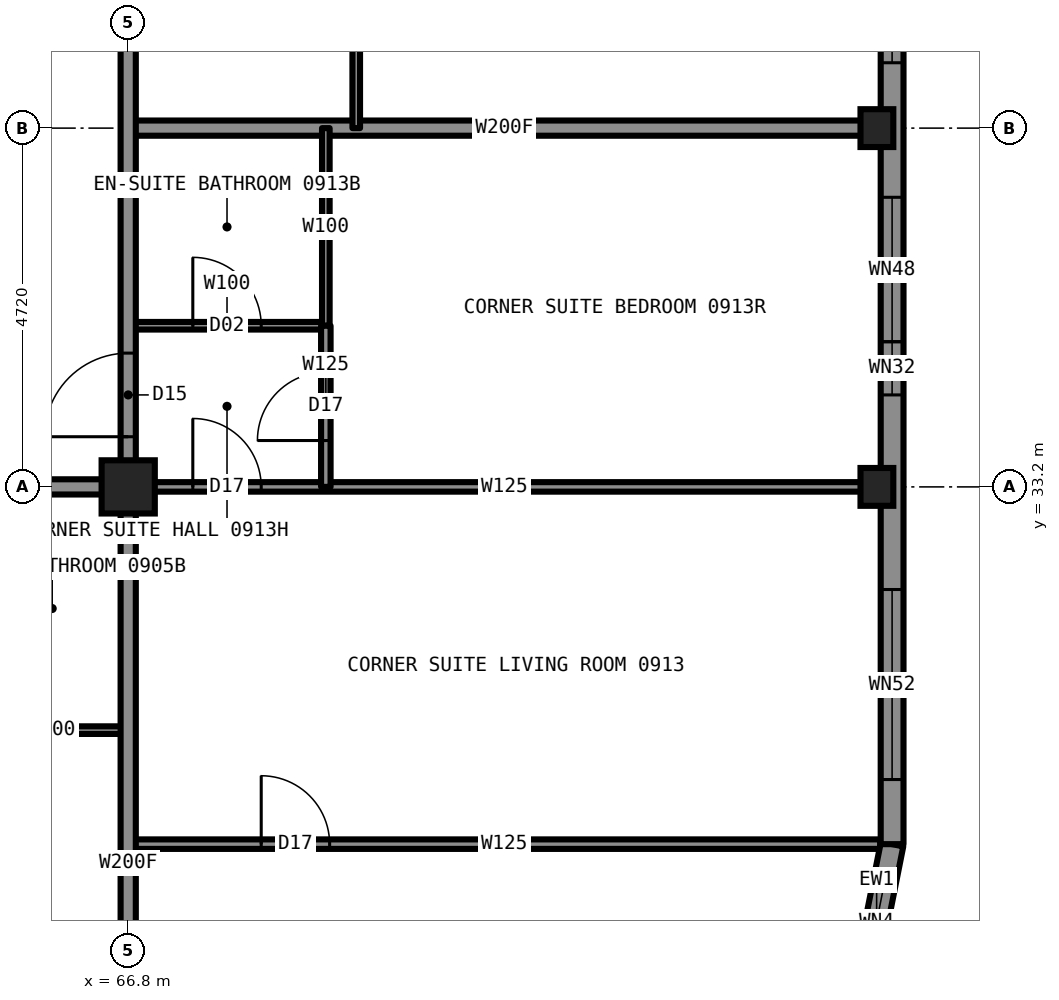
"""IFC4 building model, lengths in metres.
Left out: names, types, materials, properties, quantities, classifications, styles, units other than length and angle.
Written with IfcOpenShell. Run it as: python <this file> out.ifc"""

import sys

from ifc_helpers import new_model, si_unit, direction, frame, frame_2d, origin, origin_2d, place, context, subcontext, project, spatial, rectangle, hollow_rectangle, i_section, extrude, element, fill, save


model = new_model("IFC4")
c1 = context("Model", 3, precision=1e-05, world=origin(), true_north=direction((0.0, 1.0)))
c2 = subcontext(c1, "Body", "Model", "MODEL_VIEW")
j1 = project(units=[si_unit("LENGTHUNIT", "METRE"), si_unit("PLANEANGLEUNIT", "RADIAN")], contexts=[c1])
p1 = place(None, origin())
s1 = spatial("IfcSite", under=j1, at=p1, CompositionType="ELEMENT")
p2 = place(p1, origin())
s2 = spatial("IfcBuilding", under=s1, at=p2, CompositionType="ELEMENT")
p3 = place(p2, frame((0.0, 0.0, 39.0)))
s3 = spatial("IfcBuildingStorey", under=s2, at=p3, CompositionType="ELEMENT", Elevation=39.0)
for number, where, z_axis, x_axis in (
    (1, (76.65, 33.2, 0.0), (0.0, 0.0, 1.0), (1.0, 0.0, 0.0)),
    (2, (76.65, 37.92, 0.0), (0.0, 0.0, 1.0), (1.0, 0.0, 0.0)),
):
    element("IfcColumn", number, at=place(p3, frame(where, z_axis=z_axis, x_axis=x_axis)), inside=s3, PredefinedType="COLUMN", context=c2, shape_type="SweptSolid", body=[
        extrude(i_section(OverallWidth=0.432, OverallDepth=0.498, WebThickness=0.056, FlangeThickness=0.089, at=origin_2d()), origin(), (0.0, 0.0, 1.0), 3.5),
    ])
p4 = place(p3, frame((66.8, 33.2, 0.0), z_axis=(0.0, 0.0, 1.0), x_axis=(1.0, 0.0, 0.0)))
e3 = element("IfcColumn", 3, at=p4, inside=s3, PredefinedType="COLUMN", context=c2, shape_type="SweptSolid", body=[
    extrude(hollow_rectangle(XDim=0.7, YDim=0.7, WallThickness=0.06, at=origin_2d()), origin(), (0.0, 0.0, 1.0), 3.5),
])
p5 = place(p3, frame((43.2, 33.2, 0.0), z_axis=(0.0, 0.0, 1.0), x_axis=(1.0, 0.0, 0.0)))
e4 = element("IfcWall", 4, at=p5, inside=s3, PredefinedType="PARTITIONING", context=c2, shape_type="SweptSolid", body=[
    extrude(rectangle(XDim=23.6, YDim=0.2, at=frame_2d((11.8, 0.0))), origin(), (0.0, 0.0, 1.0), 3.33),
])
p6 = place(p5, frame((2.55, 0.0, 0.0)))
e5 = element("IfcOpeningElement", 5, at=p6, cuts=e4, PredefinedType="OPENING", context=c2, shape_type="SweptSolid", body=[
    extrude(rectangle(XDim=1.0, YDim=2.2, at=frame_2d((0.5, 1.1))), frame((0.0, 0.11, 0.0), z_axis=(0.0, -1.0, 0.0), x_axis=(1.0, 0.0, 0.0)), (0.0, 0.0, 1.0), 0.22),
])
p7 = place(p5, frame((6.57, 0.0, 0.0)))
e6 = element("IfcOpeningElement", 6, at=p7, cuts=e4, PredefinedType="OPENING", context=c2, shape_type="SweptSolid", body=[
    extrude(rectangle(XDim=1.1, YDim=2.2, at=frame_2d((0.55, 1.1))), frame((0.0, 0.11, 0.0), z_axis=(0.0, -1.0, 0.0), x_axis=(1.0, 0.0, 0.0)), (0.0, 0.0, 1.0), 0.22),
])
p8 = place(p5, frame((20.34, 0.0, 0.0)))
e7 = element("IfcOpeningElement", 7, at=p8, cuts=e4, PredefinedType="OPENING", context=c2, shape_type="SweptSolid", body=[
    extrude(rectangle(XDim=1.0, YDim=2.2, at=frame_2d((0.5, 1.1))), frame((0.0, 0.11, 0.0), z_axis=(0.0, -1.0, 0.0), x_axis=(1.0, 0.0, 0.0)), (0.0, 0.0, 1.0), 0.22),
])
p9 = place(p3, frame((66.8, 33.2, 0.0), z_axis=(0.0, 0.0, 1.0), x_axis=(1.0, 0.0, 0.0)))
e8 = element("IfcWall", 8, at=p9, inside=s3, PredefinedType="PARTITIONING", context=c2, shape_type="SweptSolid", body=[
    extrude(rectangle(XDim=9.9, YDim=0.125, at=frame_2d((4.95, 0.0))), origin(), (0.0, 0.0, 1.0), 2.573),
])
p10 = place(p9, frame((0.85, 0.0, 0.0)))
e9 = element("IfcOpeningElement", 9, at=p10, cuts=e8, PredefinedType="OPENING", context=c2, shape_type="SweptSolid", body=[
    extrude(rectangle(XDim=0.9, YDim=2.2, at=frame_2d((0.45, 1.1))), frame((0.0, 0.073, 0.0), z_axis=(0.0, -1.0, 0.0), x_axis=(1.0, 0.0, 0.0)), (0.0, 0.0, 1.0), 0.145),
])
p11 = place(p3, frame((64.8, 30.0, 0.0), z_axis=(0.0, 0.0, 1.0), x_axis=(1.0, 0.0, 0.0)))
e10 = element("IfcWall", 10, at=p11, inside=s3, PredefinedType="PARTITIONING", context=c2, shape_type="SweptSolid", body=[
    extrude(rectangle(XDim=2.0, YDim=0.1, at=frame_2d((1.0, 0.0))), origin(), (0.0, 0.0, 1.0), 3.33),
])
p12 = place(p3, frame((66.8, 28.5, 0.0), z_axis=(0.0, 0.0, 1.0), x_axis=(1.0, 0.0, 0.0)))
e11 = element("IfcWall", 11, at=p12, inside=s3, PredefinedType="PARTITIONING", context=c2, shape_type="SweptSolid", body=[
    extrude(rectangle(XDim=9.894, YDim=0.125, at=frame_2d((4.947, 0.0))), origin(), (0.0, 0.0, 1.0), 3.33),
])
p13 = place(p12, frame((1.75, 0.0, 0.0)))
e12 = element("IfcOpeningElement", 12, at=p13, cuts=e11, PredefinedType="OPENING", context=c2, shape_type="SweptSolid", body=[
    extrude(rectangle(XDim=0.9, YDim=2.2, at=frame_2d((0.45, 1.1))), frame((0.0, 0.073, 0.0), z_axis=(0.0, -1.0, 0.0), x_axis=(1.0, 0.0, 0.0)), (0.0, 0.0, 1.0), 0.145),
])
p14 = place(p3, frame((66.8, 37.92, 0.0), z_axis=(0.0, 0.0, 1.0), x_axis=(1.0, 0.0, 0.0)))
e13 = element("IfcWall", 13, at=p14, inside=s3, PredefinedType="PARTITIONING", context=c2, shape_type="SweptSolid", body=[
    extrude(rectangle(XDim=9.9, YDim=0.2, at=frame_2d((4.95, 0.0))), origin(), (0.0, 0.0, 1.0), 2.573),
])
p15 = place(p3, frame((66.8, 35.32, 0.0), z_axis=(0.0, 0.0, 1.0), x_axis=(1.0, 0.0, 0.0)))
e14 = element("IfcWall", 14, at=p15, inside=s3, PredefinedType="PARTITIONING", context=c2, shape_type="SweptSolid", body=[
    extrude(rectangle(XDim=2.6, YDim=0.1, at=frame_2d((1.3, 0.0))), origin(), (0.0, 0.0, 1.0), 3.33),
])
p16 = place(p15, frame((0.85, 0.0, 0.0)))
e15 = element("IfcOpeningElement", 15, at=p16, cuts=e14, PredefinedType="OPENING", context=c2, shape_type="SweptSolid", body=[
    extrude(rectangle(XDim=0.9, YDim=2.1, at=frame_2d((0.45, 1.05))), frame((0.0, 0.06, 0.0), z_axis=(0.0, -1.0, 0.0), x_axis=(1.0, 0.0, 0.0)), (0.0, 0.0, 1.0), 0.12),
])
p17 = place(p3, frame((66.8, 33.2, 0.0), z_axis=(0.0, 0.0, 1.0), x_axis=(0.0, 1.0, 0.0)))
e16 = element("IfcWall", 16, at=p17, inside=s3, PredefinedType="PARTITIONING", context=c2, shape_type="SweptSolid", body=[
    extrude(rectangle(XDim=23.58, YDim=0.2, at=frame_2d((11.79, 0.0))), origin(), (0.0, 0.0, 1.0), 3.33),
])
p18 = place(p17, frame((7.72, 0.0, 0.0)))
e17 = element("IfcOpeningElement", 17, at=p18, cuts=e16, PredefinedType="OPENING", context=c2, shape_type="SweptSolid", body=[
    extrude(rectangle(XDim=1.0, YDim=2.2, at=frame_2d((0.5, 1.1))), frame((0.0, 0.11, 0.0), z_axis=(0.0, -1.0, 0.0), x_axis=(1.0, 0.0, 0.0)), (0.0, 0.0, 1.0), 0.22),
])
p19 = place(p17, frame((17.31, 0.0, 0.0)))
e18 = element("IfcOpeningElement", 18, at=p19, cuts=e16, PredefinedType="OPENING", context=c2, shape_type="SweptSolid", body=[
    extrude(rectangle(XDim=1.0, YDim=2.2, at=frame_2d((0.5, 1.1))), frame((0.0, 0.11, 0.0), z_axis=(0.0, -1.0, 0.0), x_axis=(1.0, 0.0, 0.0)), (0.0, 0.0, 1.0), 0.22),
])
p20 = place(p17, frame((21.84, 0.0, 0.0)))
e19 = element("IfcOpeningElement", 19, at=p20, cuts=e16, PredefinedType="OPENING", context=c2, shape_type="SweptSolid", body=[
    extrude(rectangle(XDim=1.1, YDim=2.2, at=frame_2d((0.55, 1.1))), frame((0.0, 0.11, 0.0), z_axis=(0.0, -1.0, 0.0), x_axis=(1.0, 0.0, 0.0)), (0.0, 0.0, 1.0), 0.22),
])
p21 = place(p17, frame((0.66, 0.0, 0.0)))
e20 = element("IfcOpeningElement", 20, at=p21, cuts=e16, PredefinedType="OPENING", context=c2, shape_type="SweptSolid", body=[
    extrude(rectangle(XDim=1.1, YDim=2.2, at=frame_2d((0.55, 1.1))), frame((0.0, 0.11, 0.0), z_axis=(0.0, -1.0, 0.0), x_axis=(1.0, 0.0, 0.0)), (0.0, 0.0, 1.0), 0.22),
])
p22 = place(p3, frame((66.8, 23.3, 0.0), z_axis=(0.0, 0.0, 1.0), x_axis=(0.0, 1.0, 0.0)))
e21 = element("IfcWall", 21, at=p22, inside=s3, PredefinedType="PARTITIONING", context=c2, shape_type="SweptSolid", body=[
    extrude(rectangle(XDim=9.9, YDim=0.2, at=frame_2d((4.95, 0.0))), origin(), (0.0, 0.0, 1.0), 2.573),
])
p23 = place(p3, frame((69.4, 35.32, 0.0), z_axis=(0.0, 0.0, 1.0), x_axis=(0.0, 1.0, 0.0)))
e22 = element("IfcWall", 22, at=p23, inside=s3, PredefinedType="PARTITIONING", context=c2, shape_type="SweptSolid", body=[
    extrude(rectangle(XDim=2.6, YDim=0.1, at=frame_2d((1.3, 0.0))), origin(), (0.0, 0.0, 1.0), 3.33),
])
p24 = place(p3, frame((69.4, 33.2, 0.0), z_axis=(0.0, 0.0, 1.0), x_axis=(0.0, 1.0, 0.0)))
e23 = element("IfcWall", 23, at=p24, inside=s3, PredefinedType="PARTITIONING", context=c2, shape_type="SweptSolid", body=[
    extrude(rectangle(XDim=2.12, YDim=0.125, at=frame_2d((1.06, 0.0))), origin(), (0.0, 0.0, 1.0), 3.33),
])
p25 = place(p24, frame((0.61, 0.0, 0.0)))
e24 = element("IfcOpeningElement", 24, at=p25, cuts=e23, PredefinedType="OPENING", context=c2, shape_type="SweptSolid", body=[
    extrude(rectangle(XDim=0.9, YDim=2.2, at=frame_2d((0.45, 1.1))), frame((0.0, 0.073, 0.0), z_axis=(0.0, -1.0, 0.0), x_axis=(1.0, 0.0, 0.0)), (0.0, 0.0, 1.0), 0.145),
])
p26 = place(p3, frame((69.8, 37.92, 0.0), z_axis=(0.0, 0.0, 1.0), x_axis=(0.0, 1.0, 0.0)))
e25 = element("IfcWall", 25, at=p26, inside=s3, PredefinedType="PARTITIONING", context=c2, shape_type="SweptSolid", body=[
    extrude(rectangle(XDim=2.6, YDim=0.1, at=frame_2d((1.3, 0.0))), origin(), (0.0, 0.0, 1.0), 3.33),
])
p27 = place(p3, frame((76.443, 26.453, 0.0), z_axis=(0.0, 0.0, 1.0), x_axis=(0.195081421501, 0.980787050784, 0.0)))
e26 = element("IfcWall", 26, at=p27, inside=s3, PredefinedType="SOLIDWALL", context=c2, shape_type="SweptSolid", body=[
    extrude(rectangle(XDim=2.087, YDim=0.3, at=frame_2d((1.044, 0.0))), origin(), (0.0, 0.0, 1.0), 3.33),
])
p28 = place(p27, frame((0.444, 0.0, 0.5)))
e27 = element("IfcOpeningElement", 27, at=p28, cuts=e26, PredefinedType="OPENING", context=c2, shape_type="SweptSolid", body=[
    extrude(rectangle(XDim=1.2, YDim=2.0, at=frame_2d((0.6, 1.0))), frame((0.0, 0.16, 0.0), z_axis=(0.0, -1.0, 0.0), x_axis=(1.0, 0.0, 0.0)), (0.0, 0.0, 1.0), 0.32),
])
p29 = place(p3, frame((76.85, 28.5, 0.0), z_axis=(0.0, 0.0, 1.0), x_axis=(0.0, 1.0, 0.0)))
e28 = element("IfcWall", 28, at=p29, inside=s3, PredefinedType="SOLIDWALL", context=c2, shape_type="SweptSolid", body=[
    extrude(rectangle(XDim=33.0, YDim=0.3, at=frame_2d((16.5, 0.0))), origin(), (0.0, 0.0, 1.0), 2.83),
])
p30 = place(p29, frame((0.85, 0.0, 0.5)))
e29 = element("IfcOpeningElement", 29, at=p30, cuts=e28, PredefinedType="OPENING", context=c2, shape_type="SweptSolid", body=[
    extrude(rectangle(XDim=2.5, YDim=2.0, at=frame_2d((1.25, 1.0))), frame((0.0, 0.16, 0.0), z_axis=(0.0, -1.0, 0.0), x_axis=(1.0, 0.0, 0.0)), (0.0, 0.0, 1.0), 0.32),
])
p31 = place(p29, frame((6.61, 0.0, 0.5)))
e30 = element("IfcOpeningElement", 30, at=p31, cuts=e28, PredefinedType="OPENING", context=c2, shape_type="SweptSolid", body=[
    extrude(rectangle(XDim=1.9, YDim=1.9, at=frame_2d((0.95, 0.95))), frame((0.0, 0.16, 0.0), z_axis=(0.0, -1.0, 0.0), x_axis=(1.0, 0.0, 0.0)), (0.0, 0.0, 1.0), 0.32),
])
p32 = place(p29, frame((10.28, 0.0, 0.5)))
e31 = element("IfcOpeningElement", 31, at=p32, cuts=e28, PredefinedType="OPENING", context=c2, shape_type="SweptSolid", body=[
    extrude(rectangle(XDim=3.0, YDim=2.0, at=frame_2d((1.5, 1.0))), frame((0.0, 0.16, 0.0), z_axis=(0.0, -1.0, 0.0), x_axis=(1.0, 0.0, 0.0)), (0.0, 0.0, 1.0), 0.32),
])
p33 = place(p29, frame((15.0, 0.0, 0.5)))
e32 = element("IfcOpeningElement", 32, at=p33, cuts=e28, PredefinedType="OPENING", context=c2, shape_type="SweptSolid", body=[
    extrude(rectangle(XDim=3.0, YDim=2.0, at=frame_2d((1.5, 1.0))), frame((0.0, 0.16, 0.0), z_axis=(0.0, -1.0, 0.0), x_axis=(1.0, 0.0, 0.0)), (0.0, 0.0, 1.0), 0.32),
])
p34 = place(p29, frame((19.72, 0.0, 0.5)))
e33 = element("IfcOpeningElement", 33, at=p34, cuts=e28, PredefinedType="OPENING", context=c2, shape_type="SweptSolid", body=[
    extrude(rectangle(XDim=3.0, YDim=2.0, at=frame_2d((1.5, 1.0))), frame((0.0, 0.16, 0.0), z_axis=(0.0, -1.0, 0.0), x_axis=(1.0, 0.0, 0.0)), (0.0, 0.0, 1.0), 0.32),
])
p35 = place(p29, frame((24.44, 0.0, 0.5)))
e34 = element("IfcOpeningElement", 34, at=p35, cuts=e28, PredefinedType="OPENING", context=c2, shape_type="SweptSolid", body=[
    extrude(rectangle(XDim=1.9, YDim=1.9, at=frame_2d((0.95, 0.95))), frame((0.0, 0.16, 0.0), z_axis=(0.0, -1.0, 0.0), x_axis=(1.0, 0.0, 0.0)), (0.0, 0.0, 1.0), 0.32),
])
p36 = place(p29, frame((29.6, 0.0, 0.5)))
e35 = element("IfcOpeningElement", 35, at=p36, cuts=e28, PredefinedType="OPENING", context=c2, shape_type="SweptSolid", body=[
    extrude(rectangle(XDim=2.5, YDim=2.0, at=frame_2d((1.25, 1.0))), frame((0.0, 0.16, 0.0), z_axis=(0.0, -1.0, 0.0), x_axis=(1.0, 0.0, 0.0)), (0.0, 0.0, 1.0), 0.32),
])
p37 = place(p29, frame((5.91, 0.0, 0.5)))
e36 = element("IfcOpeningElement", 36, at=p37, cuts=e28, PredefinedType="OPENING", context=c2, shape_type="SweptSolid", body=[
    extrude(rectangle(XDim=0.7, YDim=1.0, at=frame_2d((0.35, 0.5))), frame((0.0, 0.16, 0.0), z_axis=(0.0, -1.0, 0.0), x_axis=(1.0, 0.0, 0.0)), (0.0, 0.0, 1.0), 0.32),
])
p38 = place(p29, frame((26.39, 0.0, 0.5)))
e37 = element("IfcOpeningElement", 37, at=p38, cuts=e28, PredefinedType="OPENING", context=c2, shape_type="SweptSolid", body=[
    extrude(rectangle(XDim=0.7, YDim=1.0, at=frame_2d((0.35, 0.5))), frame((0.0, 0.16, 0.0), z_axis=(0.0, -1.0, 0.0), x_axis=(1.0, 0.0, 0.0)), (0.0, 0.0, 1.0), 0.32),
])
p39 = place(p10, origin())
e38 = element("IfcDoor", 38, at=p39, inside=s3, OperationType="SINGLE_SWING_LEFT", PredefinedType="DOOR", context=c2, shape_type="SweptSolid", body=[
    extrude(rectangle(XDim=0.9, YDim=2.2, at=frame_2d((0.45, 1.1))), frame((0.0, 0.025, 0.0), z_axis=(0.0, -1.0, 0.0), x_axis=(1.0, 0.0, 0.0)), (0.0, 0.0, 1.0), 0.05),
])
fill(e9, e38)
p40 = place(p16, origin())
e39 = element("IfcDoor", 39, at=p40, inside=s3, OperationType="SINGLE_SWING_RIGHT", PredefinedType="DOOR", context=c2, shape_type="SweptSolid", body=[
    extrude(rectangle(XDim=0.9, YDim=2.1, at=frame_2d((0.45, 1.05))), frame((0.0, 0.025, 0.0), z_axis=(0.0, -1.0, 0.0), x_axis=(1.0, 0.0, 0.0)), (0.0, 0.0, 1.0), 0.05),
])
fill(e15, e39)
p41 = place(p21, origin())
e40 = element("IfcDoor", 40, at=p41, inside=s3, OperationType="SINGLE_SWING_LEFT", PredefinedType="DOOR", context=c2, shape_type="SweptSolid", body=[
    extrude(rectangle(XDim=1.1, YDim=2.2, at=frame_2d((0.55, 1.1))), frame((0.0, 0.025, 0.0), z_axis=(0.0, -1.0, 0.0), x_axis=(1.0, 0.0, 0.0)), (0.0, 0.0, 1.0), 0.05),
])
fill(e20, e40)
p42 = place(p13, origin())
e41 = element("IfcDoor", 41, at=p42, inside=s3, OperationType="SINGLE_SWING_LEFT", PredefinedType="DOOR", context=c2, shape_type="SweptSolid", body=[
    extrude(rectangle(XDim=0.9, YDim=2.2, at=frame_2d((0.45, 1.1))), frame((0.0, 0.025, 0.0), z_axis=(0.0, -1.0, 0.0), x_axis=(1.0, 0.0, 0.0)), (0.0, 0.0, 1.0), 0.05),
])
fill(e12, e41)
p43 = place(p25, origin())
e42 = element("IfcDoor", 42, at=p43, inside=s3, OperationType="SINGLE_SWING_LEFT", PredefinedType="DOOR", context=c2, shape_type="SweptSolid", body=[
    extrude(rectangle(XDim=0.9, YDim=2.2, at=frame_2d((0.45, 1.1))), frame((0.0, 0.025, 0.0), z_axis=(0.0, -1.0, 0.0), x_axis=(1.0, 0.0, 0.0)), (0.0, 0.0, 1.0), 0.05),
])
fill(e24, e42)
p44 = place(p28, origin())
e43 = element("IfcWindow", 43, at=p44, inside=s3, PartitioningType="SINGLE_PANEL", PredefinedType="WINDOW", context=c2, shape_type="SweptSolid", body=[
    extrude(rectangle(XDim=1.2, YDim=2.0, at=frame_2d((0.6, 1.0))), frame((0.0, 0.03, 0.0), z_axis=(0.0, -1.0, 0.0), x_axis=(1.0, 0.0, 0.0)), (0.0, 0.0, 1.0), 0.06),
])
fill(e27, e43)
p45 = place(p30, origin())
e44 = element("IfcWindow", 44, at=p45, inside=s3, PartitioningType="SINGLE_PANEL", PredefinedType="WINDOW", context=c2, shape_type="SweptSolid", body=[
    extrude(rectangle(XDim=2.5, YDim=2.0, at=frame_2d((1.25, 1.0))), frame((0.0, 0.03, 0.0), z_axis=(0.0, -1.0, 0.0), x_axis=(1.0, 0.0, 0.0)), (0.0, 0.0, 1.0), 0.06),
])
fill(e29, e44)
p46 = place(p31, origin())
e45 = element("IfcWindow", 45, at=p46, inside=s3, PartitioningType="SINGLE_PANEL", PredefinedType="WINDOW", context=c2, shape_type="SweptSolid", body=[
    extrude(rectangle(XDim=1.9, YDim=1.9, at=frame_2d((0.95, 0.95))), frame((0.0, 0.03, 0.0), z_axis=(0.0, -1.0, 0.0), x_axis=(1.0, 0.0, 0.0)), (0.0, 0.0, 1.0), 0.06),
])
fill(e30, e45)
p47 = place(p32, origin())
e46 = element("IfcWindow", 46, at=p47, inside=s3, PartitioningType="SINGLE_PANEL", PredefinedType="WINDOW", context=c2, shape_type="SweptSolid", body=[
    extrude(rectangle(XDim=3.0, YDim=2.0, at=frame_2d((1.5, 1.0))), frame((0.0, 0.03, 0.0), z_axis=(0.0, -1.0, 0.0), x_axis=(1.0, 0.0, 0.0)), (0.0, 0.0, 1.0), 0.06),
])
fill(e31, e46)
p48 = place(p37, origin())
e47 = element("IfcWindow", 47, at=p48, inside=s3, PartitioningType="SINGLE_PANEL", PredefinedType="WINDOW", context=c2, shape_type="SweptSolid", body=[
    extrude(rectangle(XDim=0.7, YDim=1.0, at=frame_2d((0.35, 0.5))), frame((0.0, 0.03, 0.0), z_axis=(0.0, -1.0, 0.0), x_axis=(1.0, 0.0, 0.0)), (0.0, 0.0, 1.0), 0.06),
])
fill(e36, e47)
save(model, sys.argv[1])
